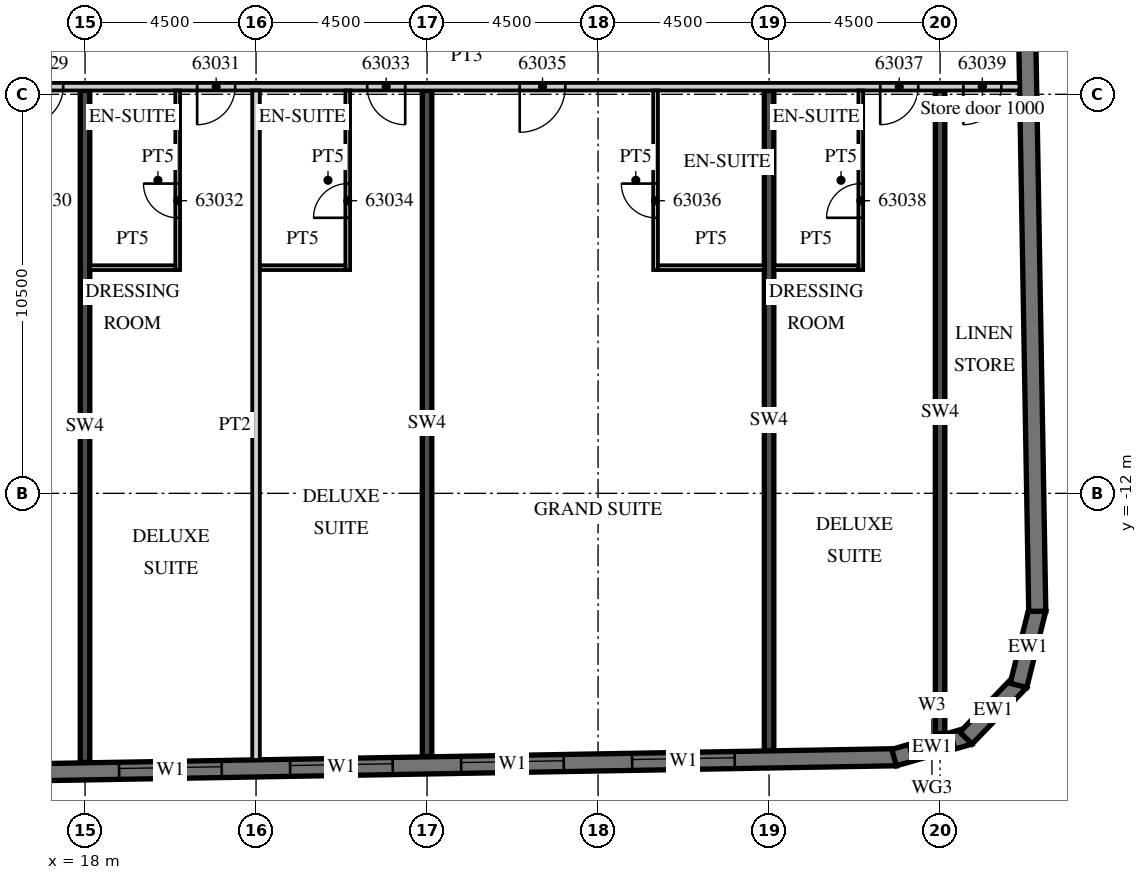
"""IFC4 building model, lengths in metres.
Left out: names, types, materials, properties, quantities, classifications, styles, units other than length and angle.
Written with IfcOpenShell. Run it as: python <this file> out.ifc"""

import sys

from ifc_helpers import new_model, si_unit, direction, frame, frame_2d, origin, place, context, subcontext, project, spatial, polyline, rectangle, outline, extrude, element, fill, save


model = new_model("IFC4")
c1 = context("Model", 3, precision=1e-05, world=origin(), true_north=direction((0.0, 1.0)))
c2 = subcontext(c1, "Body", "Model", "MODEL_VIEW")
j1 = project(units=[si_unit("LENGTHUNIT", "METRE"), si_unit("PLANEANGLEUNIT", "RADIAN")], contexts=[c1])
p1 = place(None, origin())
s1 = spatial("IfcSite", under=j1, at=p1, CompositionType="ELEMENT")
p2 = place(p1, origin())
s2 = spatial("IfcBuilding", under=s1, at=p2, CompositionType="ELEMENT")
p3 = place(p2, frame((0.0, 0.0, 254.0)))
s3 = spatial("IfcBuildingStorey", under=s2, at=p3, CompositionType="ELEMENT", Elevation=254.0)
p4 = place(p3, frame((18.0, -19.079, 0.0), z_axis=(0.0, 0.0, 1.0), x_axis=(0.0, 1.0, 0.0)))
e1 = element("IfcWall", 1, at=p4, inside=s3, PredefinedType="SHEAR", context=c2, shape_type="SweptSolid", body=[
    extrude(rectangle(XDim=17.679, YDim=0.25, at=frame_2d((8.84, 0.0))), origin(), (0.0, 0.0, 1.0), 3.0),
])
p5 = place(p3, frame((27.0, -18.922, 0.0), z_axis=(0.0, 0.0, 1.0), x_axis=(0.0, 1.0, 0.0)))
e2 = element("IfcWall", 2, at=p5, inside=s3, PredefinedType="SHEAR", context=c2, shape_type="SweptSolid", body=[
    extrude(rectangle(XDim=17.522, YDim=0.25, at=frame_2d((8.761, 0.0))), origin(), (0.0, 0.0, 1.0), 3.0),
])
p6 = place(p3, frame((36.0, -18.765, 0.0), z_axis=(0.0, 0.0, 1.0), x_axis=(0.0, 1.0, 0.0)))
e3 = element("IfcWall", 3, at=p6, inside=s3, PredefinedType="SHEAR", context=c2, shape_type="SweptSolid", body=[
    extrude(rectangle(XDim=17.365, YDim=0.25, at=frame_2d((8.683, 0.0))), origin(), (0.0, 0.0, 1.0), 3.0),
])
p7 = place(p3, frame((40.5, -18.325, 0.0), z_axis=(0.0, 0.0, 1.0), x_axis=(0.0, 1.0, 0.0)))
e4 = element("IfcWall", 4, at=p7, inside=s3, PredefinedType="SHEAR", context=c2, shape_type="SweptSolid", body=[
    extrude(rectangle(XDim=16.925, YDim=0.25, at=frame_2d((8.463, 0.0))), origin(), (0.0, 0.0, 1.0), 3.0),
])
p8 = place(p3, frame((-13.504, -19.866, 0.0), z_axis=(0.0, 0.0, 1.0), x_axis=(0.999847672978, 0.017453676992, 0.0)))
e5 = element("IfcWall", 5, at=p8, inside=s3, PredefinedType="SOLIDWALL", context=c2, shape_type="SweptSolid", body=[
    extrude(rectangle(XDim=52.86, YDim=0.45, at=frame_2d((26.43, 0.0))), origin(), (0.0, 0.0, 1.0), 3.0),
])
p9 = place(p8, frame((0.9, 0.0, 0.45)))
e6 = element("IfcOpeningElement", 6, at=p9, cuts=e5, PredefinedType="OPENING", context=c2, shape_type="SweptSolid", body=[
    extrude(rectangle(XDim=2.7, YDim=2.25, at=frame_2d((1.35, 1.125))), frame((0.0, 0.235, 0.0), z_axis=(0.0, -1.0, 0.0), x_axis=(1.0, 0.0, 0.0)), (0.0, 0.0, 1.0), 0.47),
])
p10 = place(p8, frame((5.401, 0.0, 0.45)))
e7 = element("IfcOpeningElement", 7, at=p10, cuts=e5, PredefinedType="OPENING", context=c2, shape_type="SweptSolid", body=[
    extrude(rectangle(XDim=2.7, YDim=2.25, at=frame_2d((1.35, 1.125))), frame((0.0, 0.235, 0.0), z_axis=(0.0, -1.0, 0.0), x_axis=(1.0, 0.0, 0.0)), (0.0, 0.0, 1.0), 0.47),
])
p11 = place(p8, frame((9.902, 0.0, 0.45)))
e8 = element("IfcOpeningElement", 8, at=p11, cuts=e5, PredefinedType="OPENING", context=c2, shape_type="SweptSolid", body=[
    extrude(rectangle(XDim=2.7, YDim=2.25, at=frame_2d((1.35, 1.125))), frame((0.0, 0.235, 0.0), z_axis=(0.0, -1.0, 0.0), x_axis=(1.0, 0.0, 0.0)), (0.0, 0.0, 1.0), 0.47),
])
p12 = place(p8, frame((14.402, 0.0, 0.45)))
e9 = element("IfcOpeningElement", 9, at=p12, cuts=e5, PredefinedType="OPENING", context=c2, shape_type="SweptSolid", body=[
    extrude(rectangle(XDim=2.7, YDim=2.25, at=frame_2d((1.35, 1.125))), frame((0.0, 0.235, 0.0), z_axis=(0.0, -1.0, 0.0), x_axis=(1.0, 0.0, 0.0)), (0.0, 0.0, 1.0), 0.47),
])
p13 = place(p8, frame((18.903, 0.0, 0.45)))
e10 = element("IfcOpeningElement", 10, at=p13, cuts=e5, PredefinedType="OPENING", context=c2, shape_type="SweptSolid", body=[
    extrude(rectangle(XDim=2.7, YDim=2.25, at=frame_2d((1.35, 1.125))), frame((0.0, 0.235, 0.0), z_axis=(0.0, -1.0, 0.0), x_axis=(1.0, 0.0, 0.0)), (0.0, 0.0, 1.0), 0.47),
])
p14 = place(p8, frame((23.404, 0.0, 0.45)))
e11 = element("IfcOpeningElement", 11, at=p14, cuts=e5, PredefinedType="OPENING", context=c2, shape_type="SweptSolid", body=[
    extrude(rectangle(XDim=2.7, YDim=2.25, at=frame_2d((1.35, 1.125))), frame((0.0, 0.235, 0.0), z_axis=(0.0, -1.0, 0.0), x_axis=(1.0, 0.0, 0.0)), (0.0, 0.0, 1.0), 0.47),
])
p15 = place(p8, frame((27.904, 0.0, 0.45)))
e12 = element("IfcOpeningElement", 12, at=p15, cuts=e5, PredefinedType="OPENING", context=c2, shape_type="SweptSolid", body=[
    extrude(rectangle(XDim=2.7, YDim=2.25, at=frame_2d((1.35, 1.125))), frame((0.0, 0.235, 0.0), z_axis=(0.0, -1.0, 0.0), x_axis=(1.0, 0.0, 0.0)), (0.0, 0.0, 1.0), 0.47),
])
p16 = place(p8, frame((32.405, 0.0, 0.45)))
e13 = element("IfcOpeningElement", 13, at=p16, cuts=e5, PredefinedType="OPENING", context=c2, shape_type="SweptSolid", body=[
    extrude(rectangle(XDim=2.7, YDim=2.25, at=frame_2d((1.35, 1.125))), frame((0.0, 0.235, 0.0), z_axis=(0.0, -1.0, 0.0), x_axis=(1.0, 0.0, 0.0)), (0.0, 0.0, 1.0), 0.47),
])
p17 = place(p8, frame((36.906, 0.0, 0.45)))
e14 = element("IfcOpeningElement", 14, at=p17, cuts=e5, PredefinedType="OPENING", context=c2, shape_type="SweptSolid", body=[
    extrude(rectangle(XDim=2.7, YDim=2.25, at=frame_2d((1.35, 1.125))), frame((0.0, 0.235, 0.0), z_axis=(0.0, -1.0, 0.0), x_axis=(1.0, 0.0, 0.0)), (0.0, 0.0, 1.0), 0.47),
])
p18 = place(p8, frame((41.406, 0.0, 0.45)))
e15 = element("IfcOpeningElement", 15, at=p18, cuts=e5, PredefinedType="OPENING", context=c2, shape_type="SweptSolid", body=[
    extrude(rectangle(XDim=2.7, YDim=2.25, at=frame_2d((1.35, 1.125))), frame((0.0, 0.235, 0.0), z_axis=(0.0, -1.0, 0.0), x_axis=(1.0, 0.0, 0.0)), (0.0, 0.0, 1.0), 0.47),
])
p19 = place(p8, frame((45.907, 0.0, 0.45)))
e16 = element("IfcOpeningElement", 16, at=p19, cuts=e5, PredefinedType="OPENING", context=c2, shape_type="SweptSolid", body=[
    extrude(rectangle(XDim=2.7, YDim=2.25, at=frame_2d((1.35, 1.125))), frame((0.0, 0.235, 0.0), z_axis=(0.0, -1.0, 0.0), x_axis=(1.0, 0.0, 0.0)), (0.0, 0.0, 1.0), 0.47),
])
p20 = place(p3, frame((39.29, -18.952, 0.0), z_axis=(0.0, 0.0, 1.0), x_axis=(0.961247584925, 0.275686562016, 0.0)))
e17 = element("IfcWall", 17, at=p20, inside=s3, PredefinedType="SOLIDWALL", context=c2, shape_type="SweptSolid", body=[
    extrude(outline(polyline([(0.0, -0.225), (2.071, -0.225), (1.95, 0.225), (0.121, 0.225), (0.0, -0.225)])), origin(), (0.0, 0.0, 1.0), 3.0),
])
p21 = place(p20, frame((0.435, 0.0, 0.45)))
e18 = element("IfcOpeningElement", 18, at=p21, cuts=e17, PredefinedType="OPENING", context=c2, shape_type="SweptSolid", body=[
    extrude(rectangle(XDim=1.2, YDim=2.25, at=frame_2d((0.6, 1.125))), frame((0.0, 0.235, 0.0), z_axis=(0.0, -1.0, 0.0), x_axis=(1.0, 0.0, 0.0)), (0.0, 0.0, 1.0), 0.47),
])
p22 = place(p3, frame((41.181, -18.442, 0.0), z_axis=(0.0, 0.0, 1.0), x_axis=(0.694678672846, 0.719320193998, 0.0)))
e19 = element("IfcWall", 19, at=p22, inside=s3, PredefinedType="SOLIDWALL", context=c2, shape_type="SweptSolid", body=[
    extrude(outline(polyline([(0.0, -0.225), (2.071, -0.225), (1.95, 0.225), (0.121, 0.225), (0.0, -0.225)])), origin(), (0.0, 0.0, 1.0), 3.0),
])
p23 = place(p3, frame((42.563, -17.054, 0.0), z_axis=(0.0, 0.0, 1.0), x_axis=(0.241841950319, 0.970315655375, 0.0)))
e20 = element("IfcWall", 20, at=p23, inside=s3, PredefinedType="SOLIDWALL", context=c2, shape_type="SweptSolid", body=[
    extrude(outline(polyline([(0.0, -0.225), (2.071, -0.225), (1.95, 0.225), (0.121, 0.225), (0.0, -0.225)])), origin(), (0.0, 0.0, 1.0), 3.0),
])
p24 = place(p3, frame((43.057, -15.103, 0.0), z_axis=(0.0, 0.0, 1.0), x_axis=(-0.017452408953, 0.999847695112, 0.0)))
e21 = element("IfcWall", 21, at=p24, inside=s3, PredefinedType="SOLIDWALL", context=c2, shape_type="SweptSolid", body=[
    extrude(rectangle(XDim=33.0, YDim=0.45, at=frame_2d((16.5, 0.0))), origin(), (0.0, 0.0, 1.0), 3.0),
])
p25 = place(p3, frame((13.5, -1.3, 0.0), z_axis=(0.0, 0.0, 1.0), x_axis=(1.0, 0.0, 0.0)))
e22 = element("IfcWall", 22, at=p25, inside=s3, PredefinedType="PARTITIONING", context=c2, shape_type="SweptSolid", body=[
    extrude(rectangle(XDim=29.091, YDim=0.2, at=frame_2d((14.545, 0.0))), origin(), (0.0, 0.0, 1.0), 3.0),
])
p26 = place(p25, frame((2.925, 0.0, 0.0)))
e23 = element("IfcOpeningElement", 23, at=p26, cuts=e22, PredefinedType="OPENING", context=c2, shape_type="SweptSolid", body=[
    extrude(rectangle(XDim=1.0, YDim=2.1, at=frame_2d((0.5, 1.05))), frame((0.0, 0.11, 0.0), z_axis=(0.0, -1.0, 0.0), x_axis=(1.0, 0.0, 0.0)), (0.0, 0.0, 1.0), 0.22),
])
p27 = place(p25, frame((7.45, 0.0, 0.0)))
e24 = element("IfcOpeningElement", 24, at=p27, cuts=e22, PredefinedType="OPENING", context=c2, shape_type="SweptSolid", body=[
    extrude(rectangle(XDim=1.0, YDim=2.1, at=frame_2d((0.5, 1.05))), frame((0.0, 0.11, 0.0), z_axis=(0.0, -1.0, 0.0), x_axis=(1.0, 0.0, 0.0)), (0.0, 0.0, 1.0), 0.22),
])
p28 = place(p25, frame((11.925, 0.0, 0.0)))
e25 = element("IfcOpeningElement", 25, at=p28, cuts=e22, PredefinedType="OPENING", context=c2, shape_type="SweptSolid", body=[
    extrude(rectangle(XDim=1.0, YDim=2.1, at=frame_2d((0.5, 1.05))), frame((0.0, 0.11, 0.0), z_axis=(0.0, -1.0, 0.0), x_axis=(1.0, 0.0, 0.0)), (0.0, 0.0, 1.0), 0.22),
])
p29 = place(p25, frame((15.938, 0.0, 0.0)))
e26 = element("IfcOpeningElement", 26, at=p29, cuts=e22, PredefinedType="OPENING", context=c2, shape_type="SweptSolid", body=[
    extrude(rectangle(XDim=1.2, YDim=2.1, at=frame_2d((0.6, 1.05))), frame((0.0, 0.11, 0.0), z_axis=(0.0, -1.0, 0.0), x_axis=(1.0, 0.0, 0.0)), (0.0, 0.0, 1.0), 0.22),
])
p30 = place(p25, frame((25.425, 0.0, 0.0)))
e27 = element("IfcOpeningElement", 27, at=p30, cuts=e22, PredefinedType="OPENING", context=c2, shape_type="SweptSolid", body=[
    extrude(rectangle(XDim=1.0, YDim=2.1, at=frame_2d((0.5, 1.05))), frame((0.0, 0.11, 0.0), z_axis=(0.0, -1.0, 0.0), x_axis=(1.0, 0.0, 0.0)), (0.0, 0.0, 1.0), 0.22),
])
p31 = place(p25, frame((27.611, 0.0, 0.0)))
e28 = element("IfcOpeningElement", 28, at=p31, cuts=e22, PredefinedType="OPENING", context=c2, shape_type="SweptSolid", body=[
    extrude(rectangle(XDim=1.0, YDim=2.4, at=frame_2d((0.5, 1.2))), frame((0.0, 0.11, 0.0), z_axis=(0.0, -1.0, 0.0), x_axis=(1.0, 0.0, 0.0)), (0.0, 0.0, 1.0), 0.22),
])
p32 = place(p3, frame((22.5, -19.013, 0.0), z_axis=(0.0, 0.0, 1.0), x_axis=(0.0, 1.0, 0.0)))
e29 = element("IfcWall", 29, at=p32, inside=s3, PredefinedType="PARTITIONING", context=c2, shape_type="SweptSolid", body=[
    extrude(rectangle(XDim=17.613, YDim=0.2, at=frame_2d((8.807, 0.0))), origin(), (0.0, 0.0, 1.0), 3.0),
])
p33 = place(p3, frame((20.438, -6.125, 0.0), z_axis=(0.0, 0.0, 1.0), x_axis=(0.0, 1.0, 0.0)))
e30 = element("IfcWall", 30, at=p33, inside=s3, PredefinedType="PARTITIONING", context=c2, shape_type="SweptSolid", body=[
    extrude(rectangle(XDim=4.725, YDim=0.125, at=frame_2d((2.363, 0.0))), origin(), (0.0, 0.0, 1.0), 3.0),
])
p34 = place(p33, frame((1.375, 0.0, 0.0)))
e31 = element("IfcOpeningElement", 31, at=p34, cuts=e30, PredefinedType="OPENING", context=c2, shape_type="SweptSolid", body=[
    extrude(rectangle(XDim=0.9, YDim=2.1, at=frame_2d((0.45, 1.05))), frame((0.0, 0.073, 0.0), z_axis=(0.0, -1.0, 0.0), x_axis=(1.0, 0.0, 0.0)), (0.0, 0.0, 1.0), 0.145),
])
p35 = place(p3, frame((18.125, -6.062, 0.0), z_axis=(0.0, 0.0, 1.0), x_axis=(1.0, 0.0, 0.0)))
e32 = element("IfcWall", 32, at=p35, inside=s3, PredefinedType="PARTITIONING", context=c2, shape_type="SweptSolid", body=[
    extrude(rectangle(XDim=2.25, YDim=0.125, at=frame_2d((1.125, 0.0))), origin(), (0.0, 0.0, 1.0), 3.0),
])
p36 = place(p3, frame((24.913, -6.125, 0.0), z_axis=(0.0, 0.0, 1.0), x_axis=(0.0, 1.0, 0.0)))
e33 = element("IfcWall", 33, at=p36, inside=s3, PredefinedType="PARTITIONING", context=c2, shape_type="SweptSolid", body=[
    extrude(rectangle(XDim=4.725, YDim=0.125, at=frame_2d((2.363, 0.0))), origin(), (0.0, 0.0, 1.0), 3.0),
])
p37 = place(p36, frame((1.375, 0.0, 0.0)))
e34 = element("IfcOpeningElement", 34, at=p37, cuts=e33, PredefinedType="OPENING", context=c2, shape_type="SweptSolid", body=[
    extrude(rectangle(XDim=0.9, YDim=2.1, at=frame_2d((0.45, 1.05))), frame((0.0, 0.073, 0.0), z_axis=(0.0, -1.0, 0.0), x_axis=(1.0, 0.0, 0.0)), (0.0, 0.0, 1.0), 0.145),
])
p38 = place(p3, frame((22.6, -6.062, 0.0), z_axis=(0.0, 0.0, 1.0), x_axis=(1.0, 0.0, 0.0)))
e35 = element("IfcWall", 35, at=p38, inside=s3, PredefinedType="PARTITIONING", context=c2, shape_type="SweptSolid", body=[
    extrude(rectangle(XDim=2.25, YDim=0.125, at=frame_2d((1.125, 0.0))), origin(), (0.0, 0.0, 1.0), 3.0),
])
p39 = place(p3, frame((33.013, -6.125, 0.0), z_axis=(0.0, 0.0, 1.0), x_axis=(0.0, 1.0, 0.0)))
e36 = element("IfcWall", 36, at=p39, inside=s3, PredefinedType="PARTITIONING", context=c2, shape_type="SweptSolid", body=[
    extrude(rectangle(XDim=4.725, YDim=0.125, at=frame_2d((2.363, 0.0))), origin(), (0.0, 0.0, 1.0), 3.0),
])
p40 = place(p39, frame((1.375, 0.0, 0.0)))
e37 = element("IfcOpeningElement", 37, at=p40, cuts=e36, PredefinedType="OPENING", context=c2, shape_type="SweptSolid", body=[
    extrude(rectangle(XDim=0.9, YDim=2.1, at=frame_2d((0.45, 1.05))), frame((0.0, 0.073, 0.0), z_axis=(0.0, -1.0, 0.0), x_axis=(1.0, 0.0, 0.0)), (0.0, 0.0, 1.0), 0.145),
])
p41 = place(p3, frame((33.075, -6.062, 0.0), z_axis=(0.0, 0.0, 1.0), x_axis=(1.0, 0.0, 0.0)))
e38 = element("IfcWall", 38, at=p41, inside=s3, PredefinedType="PARTITIONING", context=c2, shape_type="SweptSolid", body=[
    extrude(rectangle(XDim=2.8, YDim=0.125, at=frame_2d((1.4, 0.0))), origin(), (0.0, 0.0, 1.0), 3.0),
])
p42 = place(p3, frame((38.413, -6.125, 0.0), z_axis=(0.0, 0.0, 1.0), x_axis=(0.0, 1.0, 0.0)))
e39 = element("IfcWall", 39, at=p42, inside=s3, PredefinedType="PARTITIONING", context=c2, shape_type="SweptSolid", body=[
    extrude(rectangle(XDim=4.725, YDim=0.125, at=frame_2d((2.363, 0.0))), origin(), (0.0, 0.0, 1.0), 3.0),
])
p43 = place(p42, frame((1.375, 0.0, 0.0)))
e40 = element("IfcOpeningElement", 40, at=p43, cuts=e39, PredefinedType="OPENING", context=c2, shape_type="SweptSolid", body=[
    extrude(rectangle(XDim=0.9, YDim=2.1, at=frame_2d((0.45, 1.05))), frame((0.0, 0.073, 0.0), z_axis=(0.0, -1.0, 0.0), x_axis=(1.0, 0.0, 0.0)), (0.0, 0.0, 1.0), 0.145),
])
p44 = place(p3, frame((36.125, -6.062, 0.0), z_axis=(0.0, 0.0, 1.0), x_axis=(1.0, 0.0, 0.0)))
e41 = element("IfcWall", 41, at=p44, inside=s3, PredefinedType="PARTITIONING", context=c2, shape_type="SweptSolid", body=[
    extrude(rectangle(XDim=2.225, YDim=0.125, at=frame_2d((1.113, 0.0))), origin(), (0.0, 0.0, 1.0), 3.0),
])
p45 = place(p16, origin())
e42 = element("IfcWindow", 42, at=p45, inside=s3, PartitioningType="SINGLE_PANEL", PredefinedType="WINDOW", context=c2, shape_type="SweptSolid", body=[
    extrude(rectangle(XDim=2.7, YDim=2.25, at=frame_2d((1.35, 1.125))), frame((0.0, 0.09, 0.0), z_axis=(0.0, -1.0, 0.0), x_axis=(1.0, 0.0, 0.0)), (0.0, 0.0, 1.0), 0.06),
])
fill(e13, e42)
p46 = place(p17, origin())
e43 = element("IfcWindow", 43, at=p46, inside=s3, PartitioningType="SINGLE_PANEL", PredefinedType="WINDOW", context=c2, shape_type="SweptSolid", body=[
    extrude(rectangle(XDim=2.7, YDim=2.25, at=frame_2d((1.35, 1.125))), frame((0.0, 0.09, 0.0), z_axis=(0.0, -1.0, 0.0), x_axis=(1.0, 0.0, 0.0)), (0.0, 0.0, 1.0), 0.06),
])
fill(e14, e43)
p47 = place(p18, origin())
e44 = element("IfcWindow", 44, at=p47, inside=s3, PartitioningType="SINGLE_PANEL", PredefinedType="WINDOW", context=c2, shape_type="SweptSolid", body=[
    extrude(rectangle(XDim=2.7, YDim=2.25, at=frame_2d((1.35, 1.125))), frame((0.0, 0.09, 0.0), z_axis=(0.0, -1.0, 0.0), x_axis=(1.0, 0.0, 0.0)), (0.0, 0.0, 1.0), 0.06),
])
fill(e15, e44)
p48 = place(p19, origin())
e45 = element("IfcWindow", 45, at=p48, inside=s3, PartitioningType="SINGLE_PANEL", PredefinedType="WINDOW", context=c2, shape_type="SweptSolid", body=[
    extrude(rectangle(XDim=2.7, YDim=2.25, at=frame_2d((1.35, 1.125))), frame((0.0, 0.09, 0.0), z_axis=(0.0, -1.0, 0.0), x_axis=(1.0, 0.0, 0.0)), (0.0, 0.0, 1.0), 0.06),
])
fill(e16, e45)
p49 = place(p21, origin())
e46 = element("IfcWindow", 46, at=p49, inside=s3, PartitioningType="SINGLE_PANEL", PredefinedType="WINDOW", context=c2, shape_type="SweptSolid", body=[
    extrude(rectangle(XDim=1.2, YDim=2.25, at=frame_2d((0.6, 1.125))), frame((0.0, 0.09, 0.0), z_axis=(0.0, -1.0, 0.0), x_axis=(1.0, 0.0, 0.0)), (0.0, 0.0, 1.0), 0.06),
])
fill(e18, e46)
p50 = place(p26, origin())
e47 = element("IfcDoor", 47, at=p50, inside=s3, OperationType="SINGLE_SWING_LEFT", PredefinedType="DOOR", context=c2, shape_type="SweptSolid", body=[
    extrude(rectangle(XDim=1.0, YDim=2.1, at=frame_2d((0.5, 1.05))), frame((0.0, 0.025, 0.0), z_axis=(0.0, -1.0, 0.0), x_axis=(1.0, 0.0, 0.0)), (0.0, 0.0, 1.0), 0.05),
])
fill(e23, e47)
p51 = place(p27, origin())
e48 = element("IfcDoor", 48, at=p51, inside=s3, OperationType="SINGLE_SWING_LEFT", PredefinedType="DOOR", context=c2, shape_type="SweptSolid", body=[
    extrude(rectangle(XDim=1.0, YDim=2.1, at=frame_2d((0.5, 1.05))), frame((0.0, 0.025, 0.0), z_axis=(0.0, -1.0, 0.0), x_axis=(1.0, 0.0, 0.0)), (0.0, 0.0, 1.0), 0.05),
])
fill(e24, e48)
p52 = place(p34, origin())
e49 = element("IfcDoor", 49, at=p52, inside=s3, OperationType="SINGLE_SWING_RIGHT", PredefinedType="DOOR", context=c2, shape_type="SweptSolid", body=[
    extrude(rectangle(XDim=0.9, YDim=2.1, at=frame_2d((0.45, 1.05))), frame((0.0, 0.025, 0.0), z_axis=(0.0, -1.0, 0.0), x_axis=(1.0, 0.0, 0.0)), (0.0, 0.0, 1.0), 0.05),
])
fill(e31, e49)
p53 = place(p28, origin())
e50 = element("IfcDoor", 50, at=p53, inside=s3, OperationType="SINGLE_SWING_RIGHT", PredefinedType="DOOR", context=c2, shape_type="SweptSolid", body=[
    extrude(rectangle(XDim=1.0, YDim=2.1, at=frame_2d((0.5, 1.05))), frame((0.0, 0.025, 0.0), z_axis=(0.0, -1.0, 0.0), x_axis=(1.0, 0.0, 0.0)), (0.0, 0.0, 1.0), 0.05),
])
fill(e25, e50)
p54 = place(p37, origin())
e51 = element("IfcDoor", 51, at=p54, inside=s3, OperationType="SINGLE_SWING_LEFT", PredefinedType="DOOR", context=c2, shape_type="SweptSolid", body=[
    extrude(rectangle(XDim=0.9, YDim=2.1, at=frame_2d((0.45, 1.05))), frame((0.0, 0.025, 0.0), z_axis=(0.0, -1.0, 0.0), x_axis=(1.0, 0.0, 0.0)), (0.0, 0.0, 1.0), 0.05),
])
fill(e34, e51)
p55 = place(p29, origin())
e52 = element("IfcDoor", 52, at=p55, inside=s3, OperationType="SINGLE_SWING_LEFT", PredefinedType="DOOR", context=c2, shape_type="SweptSolid", body=[
    extrude(rectangle(XDim=1.2, YDim=2.1, at=frame_2d((0.6, 1.05))), frame((0.0, 0.025, 0.0), z_axis=(0.0, -1.0, 0.0), x_axis=(1.0, 0.0, 0.0)), (0.0, 0.0, 1.0), 0.05),
])
fill(e26, e52)
p56 = place(p40, origin())
e53 = element("IfcDoor", 53, at=p56, inside=s3, OperationType="SINGLE_SWING_RIGHT", PredefinedType="DOOR", context=c2, shape_type="SweptSolid", body=[
    extrude(rectangle(XDim=0.9, YDim=2.1, at=frame_2d((0.45, 1.05))), frame((0.0, 0.025, 0.0), z_axis=(0.0, -1.0, 0.0), x_axis=(1.0, 0.0, 0.0)), (0.0, 0.0, 1.0), 0.05),
])
fill(e37, e53)
p57 = place(p30, origin())
e54 = element("IfcDoor", 54, at=p57, inside=s3, OperationType="SINGLE_SWING_LEFT", PredefinedType="DOOR", context=c2, shape_type="SweptSolid", body=[
    extrude(rectangle(XDim=1.0, YDim=2.1, at=frame_2d((0.5, 1.05))), frame((0.0, 0.025, 0.0), z_axis=(0.0, -1.0, 0.0), x_axis=(1.0, 0.0, 0.0)), (0.0, 0.0, 1.0), 0.05),
])
fill(e27, e54)
p58 = place(p43, origin())
e55 = element("IfcDoor", 55, at=p58, inside=s3, OperationType="SINGLE_SWING_LEFT", PredefinedType="DOOR", context=c2, shape_type="SweptSolid", body=[
    extrude(rectangle(XDim=0.9, YDim=2.1, at=frame_2d((0.45, 1.05))), frame((0.0, 0.025, 0.0), z_axis=(0.0, -1.0, 0.0), x_axis=(1.0, 0.0, 0.0)), (0.0, 0.0, 1.0), 0.05),
])
fill(e40, e55)
p59 = place(p31, origin())
e56 = element("IfcDoor", 56, at=p59, inside=s3, OperationType="SINGLE_SWING_LEFT", PredefinedType="DOOR", context=c2, shape_type="SweptSolid", body=[
    extrude(rectangle(XDim=1.0, YDim=2.4, at=frame_2d((0.5, 1.2))), frame((0.0, 0.025, 0.0), z_axis=(0.0, -1.0, 0.0), x_axis=(1.0, 0.0, 0.0)), (0.0, 0.0, 1.0), 0.05),
])
fill(e28, e56)
save(model, sys.argv[1])
